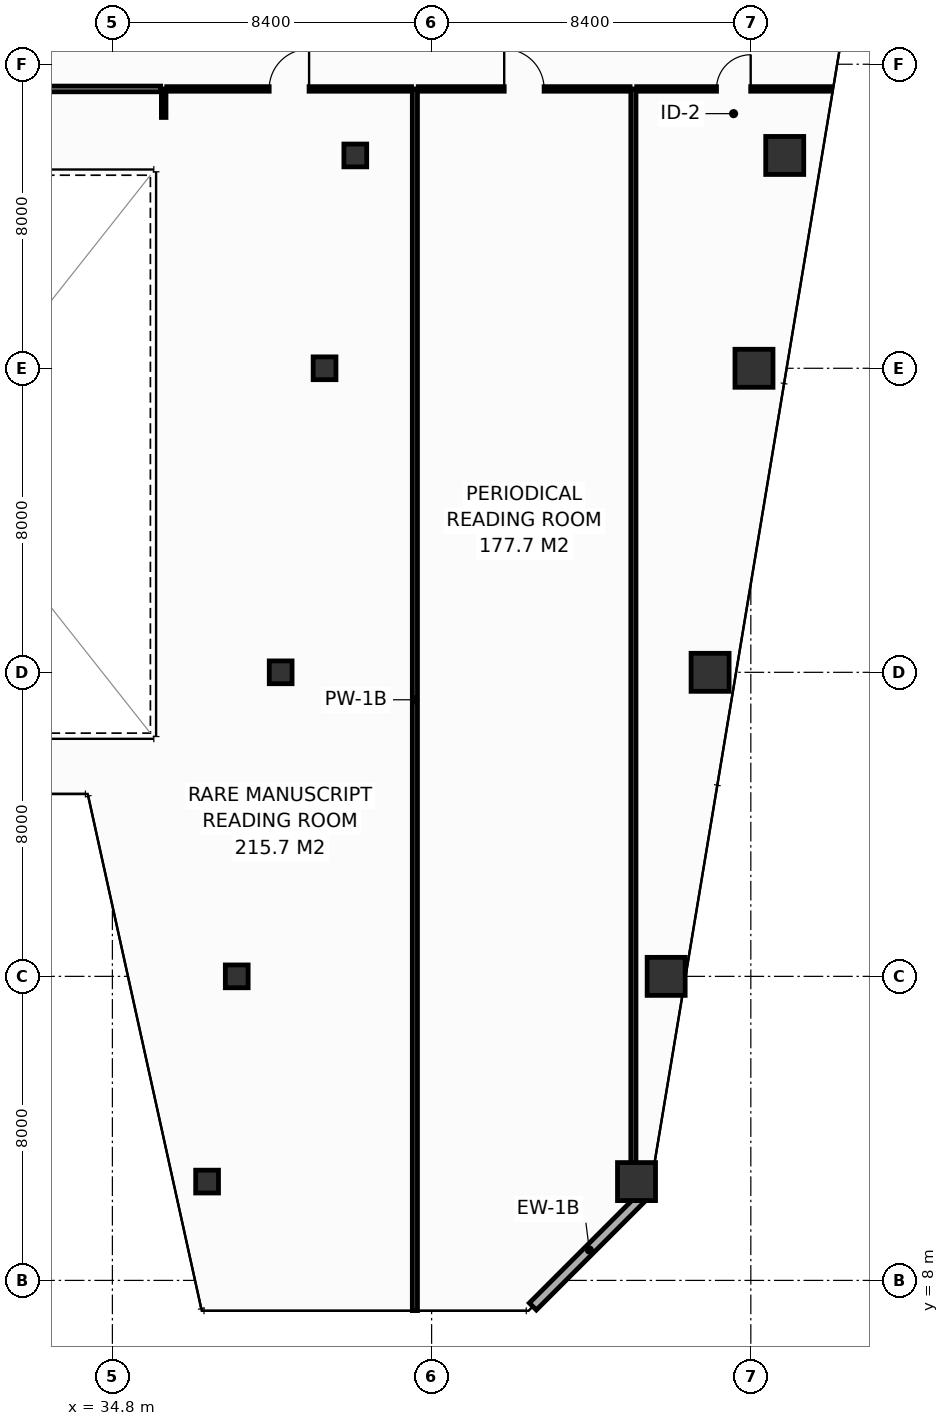
"""IFC4 building model, lengths in metres.
Left out: names, types, materials, properties, quantities, classifications, styles, units other than length and angle.
Written with IfcOpenShell. Run it as: python <this file> out.ifc"""

import sys

from ifc_helpers import new_model, si_unit, direction, frame, frame_2d, origin, origin_2d, place, context, subcontext, project, spatial, rectangle, hollow_rectangle, extrude, element, fill, save


model = new_model("IFC4")
c1 = context("Model", 3, precision=1e-05, world=origin(), true_north=direction((0.0, 1.0)))
c2 = subcontext(c1, "Body", "Model", "MODEL_VIEW")
j1 = project(units=[si_unit("LENGTHUNIT", "METRE"), si_unit("PLANEANGLEUNIT", "RADIAN")], contexts=[c1])
p1 = place(None, origin())
s1 = spatial("IfcSite", under=j1, at=p1, CompositionType="ELEMENT")
p2 = place(p1, origin())
s2 = spatial("IfcBuilding", under=s1, at=p2, CompositionType="ELEMENT")
p3 = place(p2, frame((0.0, 0.0, 152.4)))
s3 = spatial("IfcBuildingStorey", under=s2, at=p3, CompositionType="ELEMENT", Elevation=152.4)
p4 = place(p3, frame((48.592, 10.6, 0.0), z_axis=(0.0, 0.0, 1.0), x_axis=(1.0, 0.0, 0.0)))
e1 = element("IfcColumn", 1, at=p4, inside=s3, PredefinedType="COLUMN", context=c2, shape_type="SweptSolid", body=[
    extrude(hollow_rectangle(XDim=1.0, YDim=1.0, WallThickness=0.045, at=origin_2d()), origin(), (0.0, 0.0, 1.0), 3.8),
])
p5 = place(p3, frame((37.292, 10.6, 0.0), z_axis=(0.0, 0.0, 1.0), x_axis=(1.0, 0.0, 0.0)))
e2 = element("IfcColumn", 2, at=p5, inside=s3, PredefinedType="COLUMN", context=c2, shape_type="SweptSolid", body=[
    extrude(hollow_rectangle(XDim=0.6, YDim=0.6, WallThickness=0.028, at=origin_2d()), origin(), (0.0, 0.0, 1.0), 3.8),
])
p6 = place(p3, frame((49.372, 16.0, 0.0), z_axis=(0.0, 0.0, 1.0), x_axis=(1.0, 0.0, 0.0)))
e3 = element("IfcColumn", 3, at=p6, inside=s3, PredefinedType="COLUMN", context=c2, shape_type="SweptSolid", body=[
    extrude(hollow_rectangle(XDim=1.0, YDim=1.0, WallThickness=0.045, at=origin_2d()), origin(), (0.0, 0.0, 1.0), 3.8),
])
p7 = place(p3, frame((38.072, 16.0, 0.0), z_axis=(0.0, 0.0, 1.0), x_axis=(1.0, 0.0, 0.0)))
e4 = element("IfcColumn", 4, at=p7, inside=s3, PredefinedType="COLUMN", context=c2, shape_type="SweptSolid", body=[
    extrude(hollow_rectangle(XDim=0.6, YDim=0.6, WallThickness=0.028, at=origin_2d()), origin(), (0.0, 0.0, 1.0), 3.8),
])
p8 = place(p3, frame((50.528, 24.0, 0.0), z_axis=(0.0, 0.0, 1.0), x_axis=(1.0, 0.0, 0.0)))
e5 = element("IfcColumn", 5, at=p8, inside=s3, PredefinedType="COLUMN", context=c2, shape_type="SweptSolid", body=[
    extrude(hollow_rectangle(XDim=1.0, YDim=1.0, WallThickness=0.045, at=origin_2d()), origin(), (0.0, 0.0, 1.0), 3.8),
])
p9 = place(p3, frame((39.228, 24.0, 0.0), z_axis=(0.0, 0.0, 1.0), x_axis=(1.0, 0.0, 0.0)))
e6 = element("IfcColumn", 6, at=p9, inside=s3, PredefinedType="COLUMN", context=c2, shape_type="SweptSolid", body=[
    extrude(hollow_rectangle(XDim=0.6, YDim=0.6, WallThickness=0.028, at=origin_2d()), origin(), (0.0, 0.0, 1.0), 3.8),
])
p10 = place(p3, frame((51.683, 32.0, 0.0), z_axis=(0.0, 0.0, 1.0), x_axis=(1.0, 0.0, 0.0)))
e7 = element("IfcColumn", 7, at=p10, inside=s3, PredefinedType="COLUMN", context=c2, shape_type="SweptSolid", body=[
    extrude(hollow_rectangle(XDim=1.0, YDim=1.0, WallThickness=0.045, at=origin_2d()), origin(), (0.0, 0.0, 1.0), 3.8),
])
p11 = place(p3, frame((40.383, 32.0, 0.0), z_axis=(0.0, 0.0, 1.0), x_axis=(1.0, 0.0, 0.0)))
e8 = element("IfcColumn", 8, at=p11, inside=s3, PredefinedType="COLUMN", context=c2, shape_type="SweptSolid", body=[
    extrude(hollow_rectangle(XDim=0.6, YDim=0.6, WallThickness=0.028, at=origin_2d()), origin(), (0.0, 0.0, 1.0), 3.8),
])
p12 = place(p3, frame((52.492, 37.6, 0.0), z_axis=(0.0, 0.0, 1.0), x_axis=(1.0, 0.0, 0.0)))
e9 = element("IfcColumn", 9, at=p12, inside=s3, PredefinedType="COLUMN", context=c2, shape_type="SweptSolid", body=[
    extrude(hollow_rectangle(XDim=1.0, YDim=1.0, WallThickness=0.045, at=origin_2d()), origin(), (0.0, 0.0, 1.0), 3.8),
])
p13 = place(p3, frame((41.192, 37.6, 0.0), z_axis=(0.0, 0.0, 1.0), x_axis=(1.0, 0.0, 0.0)))
e10 = element("IfcColumn", 10, at=p13, inside=s3, PredefinedType="COLUMN", context=c2, shape_type="SweptSolid", body=[
    extrude(hollow_rectangle(XDim=0.6, YDim=0.6, WallThickness=0.028, at=origin_2d()), origin(), (0.0, 0.0, 1.0), 3.8),
])
p14 = place(p3, frame((45.864, 7.313, 0.0), z_axis=(0.0, 0.0, 1.0), x_axis=(0.70707775441, 0.707135806771, 0.0)))
e11 = element("IfcWall", 11, at=p14, inside=s3, PredefinedType="STANDARD", context=c2, shape_type="SweptSolid", body=[
    extrude(rectangle(XDim=4.206, YDim=0.26, at=frame_2d((2.103, 0.0))), origin(), (0.0, 0.0, 1.0), 3.55),
])
p15 = place(p3, frame((42.76, 7.205, 0.0), z_axis=(0.0, 0.0, 1.0), x_axis=(0.0, 1.0, 0.0)))
e12 = element("IfcWall", 12, at=p15, inside=s3, PredefinedType="PARTITIONING", context=c2, shape_type="SweptSolid", body=[
    extrude(rectangle(XDim=32.145, YDim=0.135, at=frame_2d((16.073, 0.0))), origin(), (0.0, 0.0, 1.0), 2.835),
])
p16 = place(p3, frame((48.51, 10.171, 0.0), z_axis=(0.0, 0.0, 1.0), x_axis=(0.0, 1.0, 0.0)))
e13 = element("IfcWall", 13, at=p16, inside=s3, PredefinedType="PARTITIONING", context=c2, shape_type="SweptSolid", body=[
    extrude(rectangle(XDim=29.179, YDim=0.135, at=frame_2d((14.59, 0.0))), origin(), (0.0, 0.0, 1.0), 2.835),
])
p17 = place(p3, frame((36.15, 38.6, 0.0), z_axis=(0.0, 0.0, 1.0), x_axis=(0.0, 1.0, 0.0)))
e14 = element("IfcWall", 14, at=p17, inside=s3, PredefinedType="PARTITIONING", context=c2, shape_type="SweptSolid", body=[
    extrude(rectangle(XDim=0.75, YDim=0.12, at=frame_2d((0.375, 0.0))), origin(), (0.0, 0.0, 1.0), 3.55),
])
p18 = place(p3, frame((23.93, 39.35, 0.0), z_axis=(0.0, 0.0, 1.0), x_axis=(1.0, 0.0, 0.0)))
e15 = element("IfcWall", 15, at=p18, inside=s3, PredefinedType="PARTITIONING", context=c2, shape_type="SweptSolid", body=[
    extrude(rectangle(XDim=12.14, YDim=0.15, at=frame_2d((6.07, 0.0))), origin(), (0.0, 0.0, 1.0), 3.55),
])
p19 = place(p3, frame((36.23, 39.35, 0.0), z_axis=(0.0, 0.0, 1.0), x_axis=(1.0, 0.0, 0.0)))
e16 = element("IfcWall", 16, at=p19, inside=s3, PredefinedType="PARTITIONING", context=c2, shape_type="SweptSolid", body=[
    extrude(rectangle(XDim=6.443, YDim=0.12, at=frame_2d((3.221, 0.0))), origin(), (0.0, 0.0, 1.0), 2.835),
])
p20 = place(p19, frame((2.696, 0.0, 0.0)))
e17 = element("IfcOpeningElement", 17, at=p20, cuts=e16, PredefinedType="OPENING", context=c2, shape_type="SweptSolid", body=[
    extrude(rectangle(XDim=1.05, YDim=2.15, at=frame_2d((0.525, 1.075))), frame((0.0, 0.07, 0.0), z_axis=(0.0, -1.0, 0.0), x_axis=(1.0, 0.0, 0.0)), (0.0, 0.0, 1.0), 0.14),
])
p21 = place(p3, frame((42.847, 39.35, 0.0), z_axis=(0.0, 0.0, 1.0), x_axis=(1.0, 0.0, 0.0)))
e18 = element("IfcWall", 18, at=p21, inside=s3, PredefinedType="PARTITIONING", context=c2, shape_type="SweptSolid", body=[
    extrude(rectangle(XDim=5.575, YDim=0.12, at=frame_2d((2.788, 0.0))), origin(), (0.0, 0.0, 1.0), 3.55),
])
p22 = place(p21, frame((2.263, 0.0, 0.0)))
e19 = element("IfcOpeningElement", 19, at=p22, cuts=e18, PredefinedType="OPENING", context=c2, shape_type="SweptSolid", body=[
    extrude(rectangle(XDim=1.05, YDim=2.15, at=frame_2d((0.525, 1.075))), frame((0.0, 0.07, 0.0), z_axis=(0.0, -1.0, 0.0), x_axis=(1.0, 0.0, 0.0)), (0.0, 0.0, 1.0), 0.14),
])
p23 = place(p3, frame((48.597, 39.35, 0.0), z_axis=(0.0, 0.0, 1.0), x_axis=(1.0, 0.0, 0.0)))
e20 = element("IfcWall", 20, at=p23, inside=s3, PredefinedType="PARTITIONING", context=c2, shape_type="SweptSolid", body=[
    extrude(rectangle(XDim=5.098, YDim=0.12, at=frame_2d((2.549, 0.0))), origin(), (0.0, 0.0, 1.0), 3.035),
])
p24 = place(p23, frame((2.099, 0.0, 0.0)))
e21 = element("IfcOpeningElement", 21, at=p24, cuts=e20, PredefinedType="OPENING", context=c2, shape_type="SweptSolid", body=[
    extrude(rectangle(XDim=0.9, YDim=2.1, at=frame_2d((0.45, 1.05))), frame((0.0, 0.07, 0.0), z_axis=(0.0, -1.0, 0.0), x_axis=(1.0, 0.0, 0.0)), (0.0, 0.0, 1.0), 0.14),
])
p25 = place(p20, origin())
e22 = element("IfcDoor", 22, at=p25, inside=s3, OperationType="SINGLE_SWING_RIGHT", PredefinedType="DOOR", context=c2, shape_type="SweptSolid", body=[
    extrude(rectangle(XDim=1.05, YDim=2.15, at=frame_2d((0.525, 1.075))), frame((0.0, 0.025, 0.0), z_axis=(0.0, -1.0, 0.0), x_axis=(1.0, 0.0, 0.0)), (0.0, 0.0, 1.0), 0.05),
])
fill(e17, e22)
p26 = place(p22, origin())
e23 = element("IfcDoor", 23, at=p26, inside=s3, OperationType="SINGLE_SWING_LEFT", PredefinedType="DOOR", context=c2, shape_type="SweptSolid", body=[
    extrude(rectangle(XDim=1.05, YDim=2.15, at=frame_2d((0.525, 1.075))), frame((0.0, 0.025, 0.0), z_axis=(0.0, -1.0, 0.0), x_axis=(1.0, 0.0, 0.0)), (0.0, 0.0, 1.0), 0.05),
])
fill(e19, e23)
p27 = place(p24, origin())
e24 = element("IfcDoor", 24, at=p27, inside=s3, OperationType="SINGLE_SWING_RIGHT", PredefinedType="DOOR", context=c2, shape_type="SweptSolid", body=[
    extrude(rectangle(XDim=0.9, YDim=2.1, at=frame_2d((0.45, 1.05))), frame((0.0, 0.025, 0.0), z_axis=(0.0, -1.0, 0.0), x_axis=(1.0, 0.0, 0.0)), (0.0, 0.0, 1.0), 0.05),
])
fill(e21, e24)
save(model, sys.argv[1])
